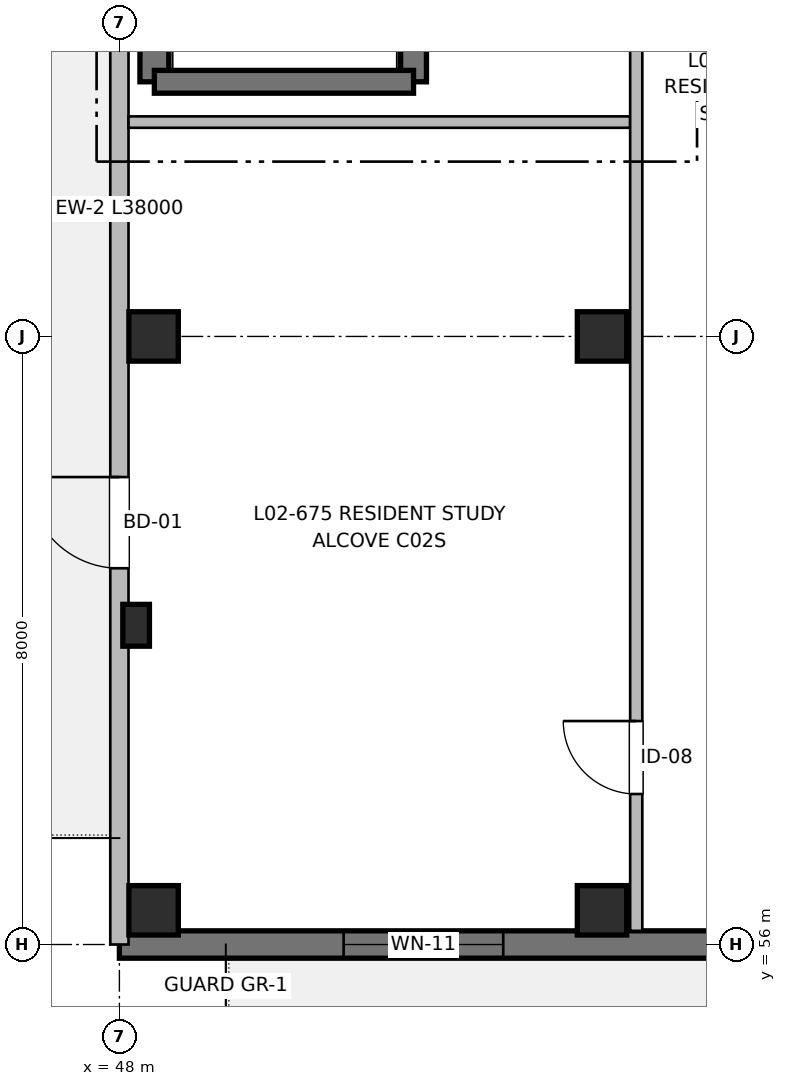
"""IFC4 building model, lengths in metres.
Left out: names, types, materials, properties, quantities, classifications, styles, units other than length and angle.
Written with IfcOpenShell. Run it as: python <this file> out.ifc"""

import sys

from ifc_helpers import new_model, si_unit, direction, frame, frame_2d, origin, origin_2d, place, context, subcontext, project, spatial, rectangle, extrude, element, fill, save


model = new_model("IFC4")
c1 = context("Model", 3, precision=1e-05, world=origin(), true_north=direction((0.0, 1.0)))
c2 = subcontext(c1, "Body", "Model", "MODEL_VIEW")
j1 = project(units=[si_unit("LENGTHUNIT", "METRE"), si_unit("PLANEANGLEUNIT", "RADIAN")], contexts=[c1])
p1 = place(None, origin())
s1 = spatial("IfcSite", under=j1, at=p1, CompositionType="ELEMENT")
p2 = place(p1, origin())
s2 = spatial("IfcBuilding", under=s1, at=p2, CompositionType="ELEMENT")
p3 = place(p2, frame((0.0, 0.0, 7.36)))
s3 = spatial("IfcBuildingStorey", under=s2, at=p3, CompositionType="ELEMENT", Elevation=7.36)
p4 = place(p3, frame((48.22, 60.2, 0.0), z_axis=(0.0, 0.0, 1.0), x_axis=(1.0, 0.0, 0.0)))
e1 = element("IfcColumn", 1, at=p4, inside=s3, PredefinedType="PILASTER", context=c2, shape_type="SweptSolid", body=[
    extrude(rectangle(XDim=0.35, YDim=0.55, at=origin_2d()), origin(), (0.0, 0.0, 1.0), 3.2),
])
for number, where, z_axis, x_axis in (
    (2, (48.45, 56.45, 0.0), (0.0, 0.0, 1.0), (1.0, 0.0, 0.0)),
    (3, (48.45, 64.0, 0.0), (0.0, 0.0, 1.0), (1.0, 0.0, 0.0)),
    (4, (54.35, 56.45, 0.0), (0.0, 0.0, 1.0), (1.0, 0.0, 0.0)),
    (5, (54.35, 64.0, 0.0), (0.0, 0.0, 1.0), (1.0, 0.0, 0.0)),
):
    element("IfcColumn", number, at=place(p3, frame(where, z_axis=z_axis, x_axis=x_axis)), inside=s3, PredefinedType="COLUMN", context=c2, shape_type="SweptSolid", body=[
        extrude(rectangle(XDim=0.65, YDim=0.65, at=origin_2d()), origin(), (0.0, 0.0, 1.0), 3.2),
    ])
p5 = place(p3, frame((48.46, 67.35, 0.0), z_axis=(0.0, 0.0, 1.0), x_axis=(0.0, 1.0, 0.0)))
e6 = element("IfcWall", 6, at=p5, inside=s3, PredefinedType="SHEAR", context=c2, shape_type="SweptSolid", body=[
    extrude(rectangle(XDim=12.45, YDim=0.38, at=frame_2d((6.225, 0.0))), origin(), (0.0, 0.0, 1.0), 3.2),
])
p6 = place(p5, frame((2.2, 0.0, 0.97)))
e7 = element("IfcOpeningElement", 7, at=p6, cuts=e6, PredefinedType="OPENING", context=c2, shape_type="SweptSolid", body=[
    extrude(rectangle(XDim=0.95, YDim=1.25, at=frame_2d((0.475, 0.625))), frame((0.0, 0.2, 0.0), z_axis=(0.0, -1.0, 0.0), x_axis=(1.0, 0.0, 0.0)), (0.0, 0.0, 1.0), 0.4),
])
p7 = place(p3, frame((51.87, 79.8, 0.0), z_axis=(0.0, 0.0, 1.0), x_axis=(0.0, -1.0, 0.0)))
e8 = element("IfcWall", 8, at=p7, inside=s3, PredefinedType="SHEAR", context=c2, shape_type="SweptSolid", body=[
    extrude(rectangle(XDim=12.45, YDim=0.34, at=frame_2d((6.225, 0.0))), origin(), (0.0, 0.0, 1.0), 3.2),
])
p8 = place(p7, frame((10.85, 0.0, 0.0)))
e9 = element("IfcOpeningElement", 9, at=p8, cuts=e8, PredefinedType="OPENING", context=c2, shape_type="SweptSolid", body=[
    extrude(rectangle(XDim=1.05, YDim=2.15, at=frame_2d((0.525, 1.075))), frame((0.0, 0.18, 0.0), z_axis=(0.0, -1.0, 0.0), x_axis=(1.0, 0.0, 0.0)), (0.0, 0.0, 1.0), 0.36),
])
p9 = place(p3, frame((51.87, 67.35, 0.0), z_axis=(0.0, 0.0, 1.0), x_axis=(-1.0, 0.0, 0.0)))
e10 = element("IfcWall", 10, at=p9, inside=s3, PredefinedType="SHEAR", context=c2, shape_type="SweptSolid", body=[
    extrude(rectangle(XDim=3.41, YDim=0.3, at=frame_2d((1.705, 0.0))), origin(), (0.0, 0.0, 1.0), 3.2),
])
p10 = place(p3, frame((64.0, 56.0, 0.0), z_axis=(0.0, 0.0, 1.0), x_axis=(-1.0, 0.0, 0.0)))
e11 = element("IfcWall", 11, at=p10, inside=s3, PredefinedType="SHEAR", context=c2, shape_type="SweptSolid", body=[
    extrude(rectangle(XDim=16.0, YDim=0.36, at=frame_2d((8.0, 0.0))), origin(), (0.0, 0.0, 1.0), 2.98),
])
p11 = place(p10, frame((3.4, 0.0, 0.0)))
e12 = element("IfcOpeningElement", 12, at=p11, cuts=e11, PredefinedType="OPENING", context=c2, shape_type="SweptSolid", body=[
    extrude(rectangle(XDim=1.2, YDim=2.2, at=frame_2d((0.6, 1.1))), frame((0.0, 0.19, 0.0), z_axis=(0.0, -1.0, 0.0), x_axis=(1.0, 0.0, 0.0)), (0.0, 0.0, 1.0), 0.38),
])
p12 = place(p10, frame((5.3, 0.0, 0.9)))
e13 = element("IfcOpeningElement", 13, at=p12, cuts=e11, PredefinedType="OPENING", context=c2, shape_type="SweptSolid", body=[
    extrude(rectangle(XDim=1.2, YDim=1.05, at=frame_2d((0.6, 0.525))), frame((0.0, 0.19, 0.0), z_axis=(0.0, -1.0, 0.0), x_axis=(1.0, 0.0, 0.0)), (0.0, 0.0, 1.0), 0.38),
])
p13 = place(p10, frame((10.95, 0.0, 0.67)))
e14 = element("IfcOpeningElement", 14, at=p13, cuts=e11, PredefinedType="OPENING", context=c2, shape_type="SweptSolid", body=[
    extrude(rectangle(XDim=2.1, YDim=1.55, at=frame_2d((1.05, 0.775))), frame((0.0, 0.19, 0.0), z_axis=(0.0, -1.0, 0.0), x_axis=(1.0, 0.0, 0.0)), (0.0, 0.0, 1.0), 0.38),
])
p14 = place(p3, frame((48.0, 56.0, 0.0), z_axis=(0.0, 0.0, 1.0), x_axis=(0.0, 1.0, 0.0)))
e15 = element("IfcWall", 15, at=p14, inside=s3, PredefinedType="SOLIDWALL", context=c2, shape_type="SweptSolid", body=[
    extrude(rectangle(XDim=38.0, YDim=0.24, at=frame_2d((19.0, 0.0))), origin(), (0.0, 0.0, 1.0), 2.98),
])
p15 = place(p14, frame((4.95, 0.0, 0.0)))
e16 = element("IfcOpeningElement", 16, at=p15, cuts=e15, PredefinedType="OPENING", context=c2, shape_type="SweptSolid", body=[
    extrude(rectangle(XDim=1.2, YDim=2.2, at=frame_2d((0.6, 1.1))), frame((0.0, 0.13, 0.0), z_axis=(0.0, -1.0, 0.0), x_axis=(1.0, 0.0, 0.0)), (0.0, 0.0, 1.0), 0.26),
])
p16 = place(p14, frame((13.2, 0.0, 0.67)))
e17 = element("IfcOpeningElement", 17, at=p16, cuts=e15, PredefinedType="OPENING", context=c2, shape_type="SweptSolid", body=[
    extrude(rectangle(XDim=2.1, YDim=1.55, at=frame_2d((1.05, 0.775))), frame((0.0, 0.13, 0.0), z_axis=(0.0, -1.0, 0.0), x_axis=(1.0, 0.0, 0.0)), (0.0, 0.0, 1.0), 0.26),
])
p17 = place(p14, frame((18.825, 0.0, 0.72)))
e18 = element("IfcOpeningElement", 18, at=p17, cuts=e15, PredefinedType="OPENING", context=c2, shape_type="SweptSolid", body=[
    extrude(rectangle(XDim=2.25, YDim=1.5, at=frame_2d((1.125, 0.75))), frame((0.0, 0.13, 0.0), z_axis=(0.0, -1.0, 0.0), x_axis=(1.0, 0.0, 0.0)), (0.0, 0.0, 1.0), 0.26),
])
p18 = place(p14, frame((32.725, 0.0, 0.9)))
e19 = element("IfcOpeningElement", 19, at=p18, cuts=e15, PredefinedType="OPENING", context=c2, shape_type="SweptSolid", body=[
    extrude(rectangle(XDim=1.05, YDim=1.15, at=frame_2d((0.525, 0.575))), frame((0.0, 0.13, 0.0), z_axis=(0.0, -1.0, 0.0), x_axis=(1.0, 0.0, 0.0)), (0.0, 0.0, 1.0), 0.26),
])
p19 = place(p3, frame((48.12, 66.82, 0.0), z_axis=(0.0, 0.0, 1.0), x_axis=(1.0, 0.0, 0.0)))
e20 = element("IfcWall", 20, at=p19, inside=s3, PredefinedType="PARTITIONING", context=c2, shape_type="SweptSolid", body=[
    extrude(rectangle(XDim=6.6, YDim=0.15, at=frame_2d((3.3, 0.0))), origin(), (0.0, 0.0, 1.0), 2.935),
])
p20 = place(p3, frame((54.8, 56.18, 0.0), z_axis=(0.0, 0.0, 1.0), x_axis=(0.0, 1.0, 0.0)))
e21 = element("IfcWall", 21, at=p20, inside=s3, PredefinedType="PARTITIONING", context=c2, shape_type="SweptSolid", body=[
    extrude(rectangle(XDim=50.62, YDim=0.16, at=frame_2d((25.31, 0.0))), origin(), (0.0, 0.0, 1.0), 2.935),
])
p21 = place(p20, frame((12.82, 0.0, 0.0)))
e22 = element("IfcOpeningElement", 22, at=p21, cuts=e21, PredefinedType="OPENING", context=c2, shape_type="SweptSolid", body=[
    extrude(rectangle(XDim=1.1, YDim=2.15, at=frame_2d((0.55, 1.075))), frame((0.0, 0.09, 0.0), z_axis=(0.0, -1.0, 0.0), x_axis=(1.0, 0.0, 0.0)), (0.0, 0.0, 1.0), 0.18),
])
p22 = place(p20, frame((19.22, 0.0, 0.0)))
e23 = element("IfcOpeningElement", 23, at=p22, cuts=e21, PredefinedType="OPENING", context=c2, shape_type="SweptSolid", body=[
    extrude(rectangle(XDim=1.6, YDim=2.15, at=frame_2d((0.8, 1.075))), frame((0.0, 0.09, 0.0), z_axis=(0.0, -1.0, 0.0), x_axis=(1.0, 0.0, 0.0)), (0.0, 0.0, 1.0), 0.18),
])
p23 = place(p20, frame((1.8, 0.0, 0.0)))
e24 = element("IfcOpeningElement", 24, at=p23, cuts=e21, PredefinedType="OPENING", context=c2, shape_type="SweptSolid", body=[
    extrude(rectangle(XDim=0.96, YDim=2.15, at=frame_2d((0.48, 1.075))), frame((0.0, 0.09, 0.0), z_axis=(0.0, -1.0, 0.0), x_axis=(1.0, 0.0, 0.0)), (0.0, 0.0, 1.0), 0.18),
])
p24 = place(p20, frame((32.625, 0.0, 0.0)))
e25 = element("IfcOpeningElement", 25, at=p24, cuts=e21, PredefinedType="OPENING", context=c2, shape_type="SweptSolid", body=[
    extrude(rectangle(XDim=0.98, YDim=2.15, at=frame_2d((0.49, 1.075))), frame((0.0, 0.09, 0.0), z_axis=(0.0, -1.0, 0.0), x_axis=(1.0, 0.0, 0.0)), (0.0, 0.0, 1.0), 0.18),
])
p25 = place(p20, frame((41.235, 0.0, 0.0)))
e26 = element("IfcOpeningElement", 26, at=p25, cuts=e21, PredefinedType="OPENING", context=c2, shape_type="SweptSolid", body=[
    extrude(rectangle(XDim=0.98, YDim=2.15, at=frame_2d((0.49, 1.075))), frame((0.0, 0.09, 0.0), z_axis=(0.0, -1.0, 0.0), x_axis=(1.0, 0.0, 0.0)), (0.0, 0.0, 1.0), 0.18),
])
p26 = place(p13, origin())
e27 = element("IfcWindow", 27, at=p26, inside=s3, PartitioningType="SINGLE_PANEL", PredefinedType="WINDOW", context=c2, shape_type="SweptSolid", body=[
    extrude(rectangle(XDim=2.1, YDim=1.55, at=frame_2d((1.05, 0.775))), frame((0.0, 0.03, 0.0), z_axis=(0.0, -1.0, 0.0), x_axis=(1.0, 0.0, 0.0)), (0.0, 0.0, 1.0), 0.06),
])
fill(e14, e27)
p27 = place(p15, origin())
e28 = element("IfcDoor", 28, at=p27, inside=s3, OperationType="SINGLE_SWING_RIGHT", PredefinedType="DOOR", context=c2, shape_type="SweptSolid", body=[
    extrude(rectangle(XDim=1.2, YDim=2.2, at=frame_2d((0.6, 1.1))), frame((0.0, 0.025, 0.0), z_axis=(0.0, -1.0, 0.0), x_axis=(1.0, 0.0, 0.0)), (0.0, 0.0, 1.0), 0.05),
])
fill(e16, e28)
p28 = place(p23, origin())
e29 = element("IfcDoor", 29, at=p28, inside=s3, OperationType="SINGLE_SWING_RIGHT", PredefinedType="DOOR", context=c2, shape_type="SweptSolid", body=[
    extrude(rectangle(XDim=0.96, YDim=2.15, at=frame_2d((0.48, 1.075))), frame((0.0, 0.025, 0.0), z_axis=(0.0, -1.0, 0.0), x_axis=(1.0, 0.0, 0.0)), (0.0, 0.0, 1.0), 0.05),
])
fill(e24, e29)
save(model, sys.argv[1])
